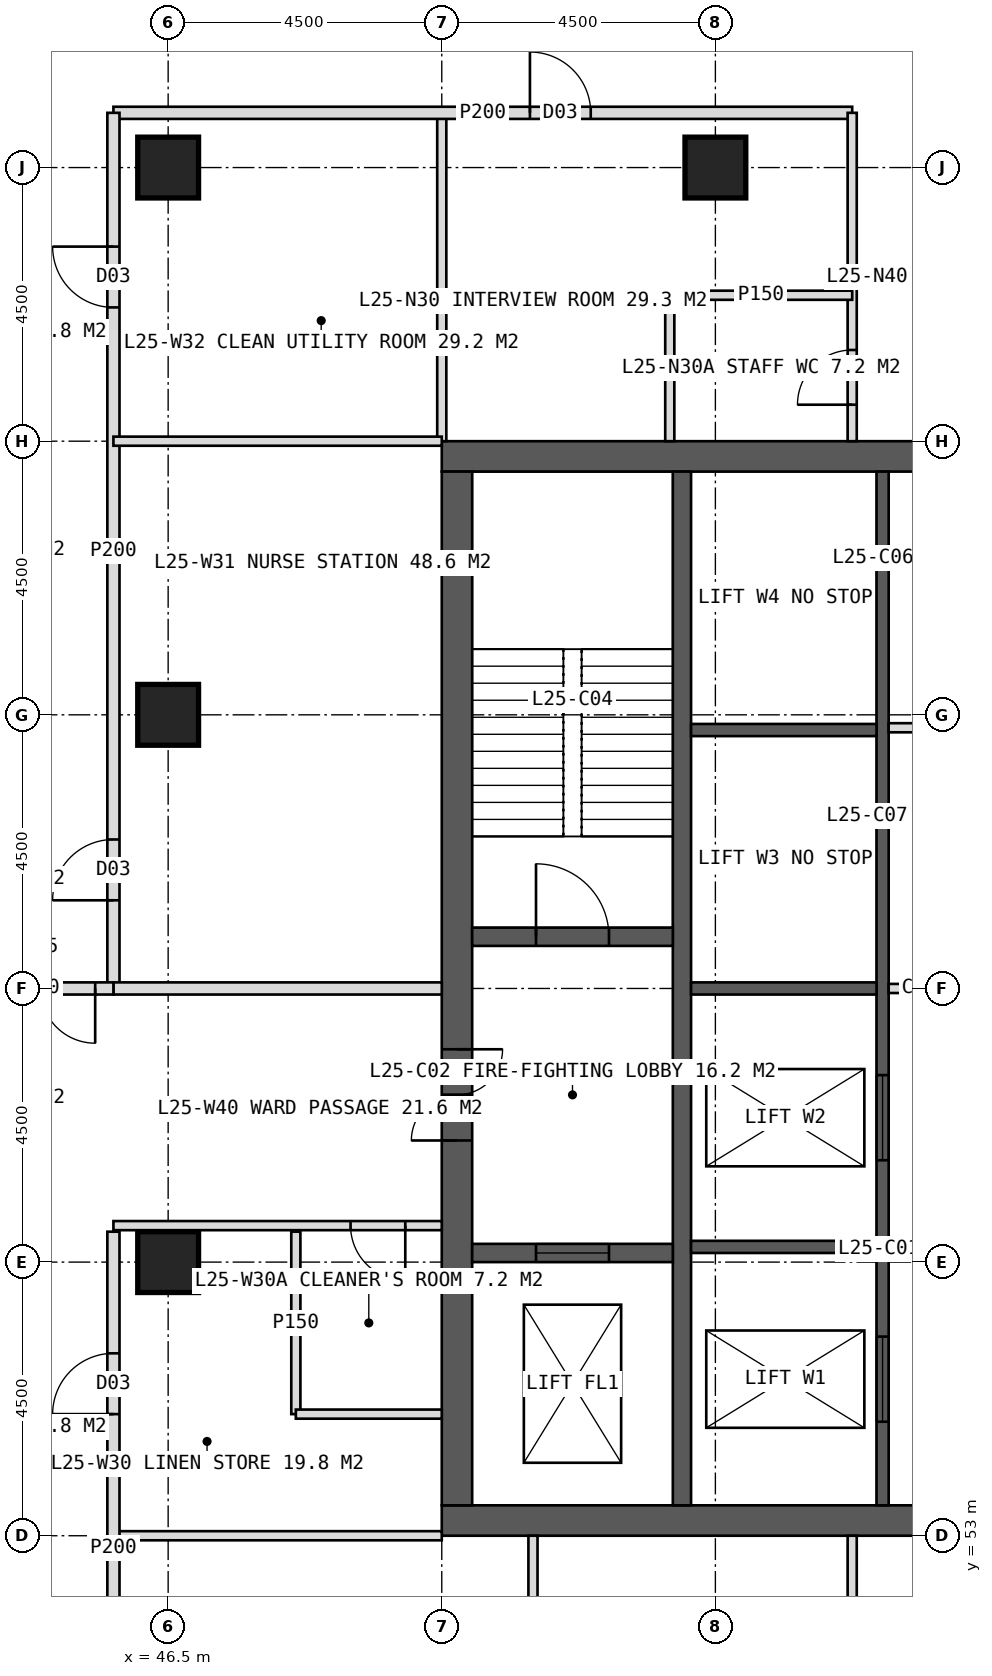
"""IFC4 building model, lengths in metres.
Left out: names, types, materials, properties, quantities, classifications, styles, units other than length and angle.
Written with IfcOpenShell. Run it as: python <this file> out.ifc"""

import sys

from ifc_helpers import new_model, si_unit, direction, frame, frame_2d, origin, origin_2d, place, context, subcontext, project, spatial, rectangle, hollow_rectangle, extrude, element, fill, save


model = new_model("IFC4")
c1 = context("Model", 3, precision=1e-05, world=origin(), true_north=direction((0.0, 1.0)))
c2 = subcontext(c1, "Body", "Model", "MODEL_VIEW")
j1 = project(units=[si_unit("LENGTHUNIT", "METRE"), si_unit("PLANEANGLEUNIT", "RADIAN")], contexts=[c1])
p1 = place(None, origin())
s1 = spatial("IfcSite", under=j1, at=p1, CompositionType="ELEMENT")
p2 = place(p1, origin())
s2 = spatial("IfcBuilding", under=s1, at=p2, CompositionType="ELEMENT")
p3 = place(p2, frame((0.0, 0.0, 108.0)))
s3 = spatial("IfcBuildingStorey", under=s2, at=p3, CompositionType="ELEMENT", Elevation=108.0)
p4 = place(p3, frame((51.0, 70.75, 0.0), z_axis=(0.0, 0.0, 1.0), x_axis=(1.0, 0.0, 0.0)))
e1 = element("IfcWall", 1, at=p4, inside=s3, PredefinedType="SHEAR", context=c2, shape_type="SweptSolid", body=[
    extrude(rectangle(XDim=18.0, YDim=0.5, at=frame_2d((9.0, 0.0))), origin(), (0.0, 0.0, 1.0), 4.0),
])
p5 = place(p4, frame((8.1, 0.0, 0.0)))
e2 = element("IfcOpeningElement", 2, at=p5, cuts=e1, PredefinedType="OPENING", context=c2, shape_type="SweptSolid", body=[
    extrude(rectangle(XDim=1.8, YDim=2.2, at=frame_2d((0.9, 1.1))), frame((0.0, 0.26, 0.0), z_axis=(0.0, -1.0, 0.0), x_axis=(1.0, 0.0, 0.0)), (0.0, 0.0, 1.0), 0.52),
])
p6 = place(p3, frame((51.0, 53.25, 0.0), z_axis=(0.0, 0.0, 1.0), x_axis=(1.0, 0.0, 0.0)))
e3 = element("IfcWall", 3, at=p6, inside=s3, PredefinedType="SHEAR", context=c2, shape_type="SweptSolid", body=[
    extrude(rectangle(XDim=18.0, YDim=0.5, at=frame_2d((9.0, 0.0))), origin(), (0.0, 0.0, 1.0), 4.0),
])
p7 = place(p6, frame((8.1, 0.0, 0.0)))
e4 = element("IfcOpeningElement", 4, at=p7, cuts=e3, PredefinedType="OPENING", context=c2, shape_type="SweptSolid", body=[
    extrude(rectangle(XDim=1.8, YDim=2.2, at=frame_2d((0.9, 1.1))), frame((0.0, 0.26, 0.0), z_axis=(0.0, -1.0, 0.0), x_axis=(1.0, 0.0, 0.0)), (0.0, 0.0, 1.0), 0.52),
])
p8 = place(p3, frame((51.25, 53.5, 0.0), z_axis=(0.0, 0.0, 1.0), x_axis=(0.0, 1.0, 0.0)))
e5 = element("IfcWall", 5, at=p8, inside=s3, PredefinedType="SHEAR", context=c2, shape_type="SweptSolid", body=[
    extrude(rectangle(XDim=17.0, YDim=0.5, at=frame_2d((8.5, 0.0))), origin(), (0.0, 0.0, 1.0), 4.0),
])
p9 = place(p8, frame((6.0, 0.0, 0.0)))
e6 = element("IfcOpeningElement", 6, at=p9, cuts=e5, PredefinedType="OPENING", context=c2, shape_type="SweptSolid", body=[
    extrude(rectangle(XDim=1.5, YDim=2.2, at=frame_2d((0.75, 1.1))), frame((0.0, 0.26, 0.0), z_axis=(0.0, -1.0, 0.0), x_axis=(1.0, 0.0, 0.0)), (0.0, 0.0, 1.0), 0.52),
])
p10 = place(p3, frame((54.95, 53.5, 0.0), z_axis=(0.0, 0.0, 1.0), x_axis=(0.0, 1.0, 0.0)))
e7 = element("IfcWall", 7, at=p10, inside=s3, PredefinedType="SHEAR", context=c2, shape_type="SweptSolid", body=[
    extrude(rectangle(XDim=17.0, YDim=0.3, at=frame_2d((8.5, 0.0))), origin(), (0.0, 0.0, 1.0), 4.0),
])
p11 = place(p3, frame((58.25, 53.5, 0.0), z_axis=(0.0, 0.0, 1.0), x_axis=(0.0, 1.0, 0.0)))
e8 = element("IfcWall", 8, at=p11, inside=s3, PredefinedType="SHEAR", context=c2, shape_type="SweptSolid", body=[
    extrude(rectangle(XDim=17.0, YDim=0.2, at=frame_2d((8.5, 0.0))), origin(), (0.0, 0.0, 1.0), 4.0),
])
p12 = place(p11, frame((1.375, 0.0, 0.0)))
e9 = element("IfcOpeningElement", 9, at=p12, cuts=e8, PredefinedType="OPENING", context=c2, shape_type="SweptSolid", body=[
    extrude(rectangle(XDim=1.4, YDim=2.2, at=frame_2d((0.7, 1.1))), frame((0.0, 0.11, 0.0), z_axis=(0.0, -1.0, 0.0), x_axis=(1.0, 0.0, 0.0)), (0.0, 0.0, 1.0), 0.22),
])
p13 = place(p11, frame((5.675, 0.0, 0.0)))
e10 = element("IfcOpeningElement", 10, at=p13, cuts=e8, PredefinedType="OPENING", context=c2, shape_type="SweptSolid", body=[
    extrude(rectangle(XDim=1.4, YDim=2.2, at=frame_2d((0.7, 1.1))), frame((0.0, 0.11, 0.0), z_axis=(0.0, -1.0, 0.0), x_axis=(1.0, 0.0, 0.0)), (0.0, 0.0, 1.0), 0.22),
])
for number, where, z_axis, x_axis in (
    (11, (55.1, 57.75, 0.0), (0.0, 0.0, 1.0), (1.0, 0.0, 0.0)),
    (12, (55.1, 62.0, 0.0), (0.0, 0.0, 1.0), (1.0, 0.0, 0.0)),
    (13, (55.1, 66.25, 0.0), (0.0, 0.0, 1.0), (1.0, 0.0, 0.0)),
):
    element("IfcWall", number, at=place(p3, frame(where, z_axis=z_axis, x_axis=x_axis)), inside=s3, PredefinedType="SHEAR", context=c2, shape_type="SweptSolid", body=[
        extrude(rectangle(XDim=3.05, YDim=0.2, at=frame_2d((1.525, 0.0))), origin(), (0.0, 0.0, 1.0), 4.0),
    ])
p14 = place(p3, frame((51.5, 62.85, 0.0), z_axis=(0.0, 0.0, 1.0), x_axis=(1.0, 0.0, 0.0)))
e14 = element("IfcWall", 14, at=p14, inside=s3, PredefinedType="SHEAR", context=c2, shape_type="SweptSolid", body=[
    extrude(rectangle(XDim=3.3, YDim=0.3, at=frame_2d((1.65, 0.0))), origin(), (0.0, 0.0, 1.0), 4.0),
])
p15 = place(p14, frame((1.05, 0.0, 0.0)))
e15 = element("IfcOpeningElement", 15, at=p15, cuts=e14, PredefinedType="OPENING", context=c2, shape_type="SweptSolid", body=[
    extrude(rectangle(XDim=1.2, YDim=2.1, at=frame_2d((0.6, 1.05))), frame((0.0, 0.16, 0.0), z_axis=(0.0, -1.0, 0.0), x_axis=(1.0, 0.0, 0.0)), (0.0, 0.0, 1.0), 0.32),
])
p16 = place(p3, frame((51.5, 57.65, 0.0), z_axis=(0.0, 0.0, 1.0), x_axis=(1.0, 0.0, 0.0)))
e16 = element("IfcWall", 16, at=p16, inside=s3, PredefinedType="SHEAR", context=c2, shape_type="SweptSolid", body=[
    extrude(rectangle(XDim=3.3, YDim=0.3, at=frame_2d((1.65, 0.0))), origin(), (0.0, 0.0, 1.0), 4.0),
])
p17 = place(p16, frame((1.05, 0.0, 0.0)))
e17 = element("IfcOpeningElement", 17, at=p17, cuts=e16, PredefinedType="OPENING", context=c2, shape_type="SweptSolid", body=[
    extrude(rectangle(XDim=1.2, YDim=2.2, at=frame_2d((0.6, 1.1))), frame((0.0, 0.16, 0.0), z_axis=(0.0, -1.0, 0.0), x_axis=(1.0, 0.0, 0.0)), (0.0, 0.0, 1.0), 0.32),
])
for number, where, z_axis, x_axis in (
    (18, (46.5, 75.5, 0.0), (0.0, 0.0, 1.0), (1.0, 0.0, 0.0)),
    (19, (55.5, 75.5, 0.0), (0.0, 0.0, 1.0), (1.0, 0.0, 0.0)),
    (20, (46.5, 57.5, 0.0), (0.0, 0.0, 1.0), (1.0, 0.0, 0.0)),
    (21, (46.5, 66.5, 0.0), (0.0, 0.0, 1.0), (1.0, 0.0, 0.0)),
):
    element("IfcColumn", number, at=place(p3, frame(where, z_axis=z_axis, x_axis=x_axis)), inside=s3, PredefinedType="COLUMN", context=c2, shape_type="SweptSolid", body=[
        extrude(hollow_rectangle(XDim=1.0, YDim=1.0, WallThickness=0.1, at=origin_2d()), origin(), (0.0, 0.0, 1.0), 4.0),
    ])
p18 = place(p3, frame((51.0, 71.0, 0.0), z_axis=(0.0, 0.0, 1.0), x_axis=(0.0, 1.0, 0.0)))
e22 = element("IfcWall", 22, at=p18, inside=s3, PredefinedType="PARTITIONING", context=c2, shape_type="SweptSolid", body=[
    extrude(rectangle(XDim=5.4, YDim=0.15, at=frame_2d((2.7, 0.0))), origin(), (0.0, 0.0, 1.0), 3.75),
])
p19 = place(p3, frame((45.6, 76.4, 0.0), z_axis=(0.0, 0.0, 1.0), x_axis=(1.0, 0.0, 0.0)))
e23 = element("IfcWall", 23, at=p19, inside=s3, PredefinedType="PARTITIONING", context=c2, shape_type="SweptSolid", body=[
    extrude(rectangle(XDim=12.15, YDim=0.2, at=frame_2d((6.075, 0.0))), origin(), (0.0, 0.0, 1.0), 3.75),
])
p20 = place(p19, frame((6.85, 0.0, 0.0)))
e24 = element("IfcOpeningElement", 24, at=p20, cuts=e23, PredefinedType="OPENING", context=c2, shape_type="SweptSolid", body=[
    extrude(rectangle(XDim=1.0, YDim=2.1, at=frame_2d((0.5, 1.05))), frame((0.0, 0.11, 0.0), z_axis=(0.0, -1.0, 0.0), x_axis=(1.0, 0.0, 0.0)), (0.0, 0.0, 1.0), 0.22),
])
p21 = place(p3, frame((57.75, 71.0, 0.0), z_axis=(0.0, 0.0, 1.0), x_axis=(0.0, 1.0, 0.0)))
e25 = element("IfcWall", 25, at=p21, inside=s3, PredefinedType="PARTITIONING", context=c2, shape_type="SweptSolid", body=[
    extrude(rectangle(XDim=5.4, YDim=0.15, at=frame_2d((2.7, 0.0))), origin(), (0.0, 0.0, 1.0), 3.75),
])
p22 = place(p21, frame((0.6, 0.0, 0.0)))
e26 = element("IfcOpeningElement", 26, at=p22, cuts=e25, PredefinedType="OPENING", context=c2, shape_type="SweptSolid", body=[
    extrude(rectangle(XDim=0.9, YDim=2.1, at=frame_2d((0.45, 1.05))), frame((0.0, 0.085, 0.0), z_axis=(0.0, -1.0, 0.0), x_axis=(1.0, 0.0, 0.0)), (0.0, 0.0, 1.0), 0.17),
])
p23 = place(p3, frame((54.75, 73.4, 0.0), z_axis=(0.0, 0.0, 1.0), x_axis=(1.0, 0.0, 0.0)))
e27 = element("IfcWall", 27, at=p23, inside=s3, PredefinedType="PARTITIONING", context=c2, shape_type="SweptSolid", body=[
    extrude(rectangle(XDim=3.0, YDim=0.15, at=frame_2d((1.5, 0.0))), origin(), (0.0, 0.0, 1.0), 3.75),
])
p24 = place(p3, frame((54.75, 71.0, 0.0), z_axis=(0.0, 0.0, 1.0), x_axis=(0.0, 1.0, 0.0)))
e28 = element("IfcWall", 28, at=p24, inside=s3, PredefinedType="PARTITIONING", context=c2, shape_type="SweptSolid", body=[
    extrude(rectangle(XDim=2.4, YDim=0.15, at=frame_2d((1.2, 0.0))), origin(), (0.0, 0.0, 1.0), 3.75),
])
p25 = place(p3, frame((51.0, 53.0, 0.0), z_axis=(0.0, 0.0, 1.0), x_axis=(-1.0, 0.0, 0.0)))
e29 = element("IfcWall", 29, at=p25, inside=s3, PredefinedType="PARTITIONING", context=c2, shape_type="SweptSolid", body=[
    extrude(rectangle(XDim=5.4, YDim=0.15, at=frame_2d((2.7, 0.0))), origin(), (0.0, 0.0, 1.0), 3.75),
])
p26 = place(p3, frame((45.6, 47.6, 0.0), z_axis=(0.0, 0.0, 1.0), x_axis=(0.0, 1.0, 0.0)))
e30 = element("IfcWall", 30, at=p26, inside=s3, PredefinedType="PARTITIONING", context=c2, shape_type="SweptSolid", body=[
    extrude(rectangle(XDim=10.4, YDim=0.2, at=frame_2d((5.2, 0.0))), origin(), (0.0, 0.0, 1.0), 3.75),
])
p27 = place(p26, frame((7.4, 0.0, 0.0)))
e31 = element("IfcOpeningElement", 31, at=p27, cuts=e30, PredefinedType="OPENING", context=c2, shape_type="SweptSolid", body=[
    extrude(rectangle(XDim=1.0, YDim=2.1, at=frame_2d((0.5, 1.05))), frame((0.0, 0.11, 0.0), z_axis=(0.0, -1.0, 0.0), x_axis=(1.0, 0.0, 0.0)), (0.0, 0.0, 1.0), 0.22),
])
p28 = place(p3, frame((45.6, 62.0, 0.0), z_axis=(0.0, 0.0, 1.0), x_axis=(0.0, 1.0, 0.0)))
e32 = element("IfcWall", 32, at=p28, inside=s3, PredefinedType="PARTITIONING", context=c2, shape_type="SweptSolid", body=[
    extrude(rectangle(XDim=14.4, YDim=0.2, at=frame_2d((7.2, 0.0))), origin(), (0.0, 0.0, 1.0), 3.75),
])
p29 = place(p28, frame((1.45, 0.0, 0.0)))
e33 = element("IfcOpeningElement", 33, at=p29, cuts=e32, PredefinedType="OPENING", context=c2, shape_type="SweptSolid", body=[
    extrude(rectangle(XDim=1.0, YDim=2.1, at=frame_2d((0.5, 1.05))), frame((0.0, 0.11, 0.0), z_axis=(0.0, -1.0, 0.0), x_axis=(1.0, 0.0, 0.0)), (0.0, 0.0, 1.0), 0.22),
])
p30 = place(p28, frame((11.2, 0.0, 0.0)))
e34 = element("IfcOpeningElement", 34, at=p30, cuts=e32, PredefinedType="OPENING", context=c2, shape_type="SweptSolid", body=[
    extrude(rectangle(XDim=1.0, YDim=2.1, at=frame_2d((0.5, 1.05))), frame((0.0, 0.11, 0.0), z_axis=(0.0, -1.0, 0.0), x_axis=(1.0, 0.0, 0.0)), (0.0, 0.0, 1.0), 0.22),
])
p31 = place(p3, frame((51.0, 58.1, 0.0), z_axis=(0.0, 0.0, 1.0), x_axis=(-1.0, 0.0, 0.0)))
e35 = element("IfcWall", 35, at=p31, inside=s3, PredefinedType="PARTITIONING", context=c2, shape_type="SweptSolid", body=[
    extrude(rectangle(XDim=5.4, YDim=0.15, at=frame_2d((2.7, 0.0))), origin(), (0.0, 0.0, 1.0), 3.75),
])
p32 = place(p31, frame((0.6, 0.0, 0.0)))
e36 = element("IfcOpeningElement", 36, at=p32, cuts=e35, PredefinedType="OPENING", context=c2, shape_type="SweptSolid", body=[
    extrude(rectangle(XDim=0.9, YDim=2.1, at=frame_2d((0.45, 1.05))), frame((0.0, 0.085, 0.0), z_axis=(0.0, -1.0, 0.0), x_axis=(1.0, 0.0, 0.0)), (0.0, 0.0, 1.0), 0.17),
])
p33 = place(p3, frame((51.0, 62.0, 0.0), z_axis=(0.0, 0.0, 1.0), x_axis=(-1.0, 0.0, 0.0)))
e37 = element("IfcWall", 37, at=p33, inside=s3, PredefinedType="SOLIDWALL", context=c2, shape_type="SweptSolid", body=[
    extrude(rectangle(XDim=5.4, YDim=0.2, at=frame_2d((2.7, 0.0))), origin(), (0.0, 0.0, 1.0), 2.95),
])
p34 = place(p3, frame((51.0, 71.0, 0.0), z_axis=(0.0, 0.0, 1.0), x_axis=(-1.0, 0.0, 0.0)))
e38 = element("IfcWall", 38, at=p34, inside=s3, PredefinedType="PARTITIONING", context=c2, shape_type="SweptSolid", body=[
    extrude(rectangle(XDim=5.4, YDim=0.15, at=frame_2d((2.7, 0.0))), origin(), (0.0, 0.0, 1.0), 3.75),
])
p35 = place(p3, frame((48.6, 55.0, 0.0), z_axis=(0.0, 0.0, 1.0), x_axis=(0.0, 1.0, 0.0)))
e39 = element("IfcWall", 39, at=p35, inside=s3, PredefinedType="PARTITIONING", context=c2, shape_type="SweptSolid", body=[
    extrude(rectangle(XDim=3.0, YDim=0.15, at=frame_2d((1.5, 0.0))), origin(), (0.0, 0.0, 1.0), 3.75),
])
p36 = place(p3, frame((51.0, 55.0, 0.0), z_axis=(0.0, 0.0, 1.0), x_axis=(-1.0, 0.0, 0.0)))
e40 = element("IfcWall", 40, at=p36, inside=s3, PredefinedType="PARTITIONING", context=c2, shape_type="SweptSolid", body=[
    extrude(rectangle(XDim=2.4, YDim=0.15, at=frame_2d((1.2, 0.0))), origin(), (0.0, 0.0, 1.0), 3.75),
])
for number, where, z_axis, x_axis in (
    (41, (57.75, 53.0, 0.0), (0.0, 0.0, 1.0), (0.0, -1.0, 0.0)),
    (42, (52.5, 53.0, 0.0), (0.0, 0.0, 1.0), (0.0, -1.0, 0.0)),
):
    element("IfcWall", number, at=place(p3, frame(where, z_axis=z_axis, x_axis=x_axis)), inside=s3, PredefinedType="PARTITIONING", context=c2, shape_type="SweptSolid", body=[
        extrude(rectangle(XDim=5.4, YDim=0.15, at=frame_2d((2.7, 0.0))), origin(), (0.0, 0.0, 1.0), 3.75),
    ])
p37 = place(p3, frame((45.6, 62.0, 0.0), z_axis=(0.0, 0.0, 1.0), x_axis=(-1.0, 0.0, 0.0)))
e43 = element("IfcWall", 43, at=p37, inside=s3, PredefinedType="SOLIDWALL", context=c2, shape_type="SweptSolid", body=[
    extrude(rectangle(XDim=2.7, YDim=0.2, at=frame_2d((1.35, 0.0))), origin(), (0.0, 0.0, 1.0), 2.95),
])
p38 = place(p37, frame((0.3, 0.0, 0.0)))
e44 = element("IfcOpeningElement", 44, at=p38, cuts=e43, PredefinedType="OPENING", context=c2, shape_type="SweptSolid", body=[
    extrude(rectangle(XDim=1.8, YDim=2.2, at=frame_2d((0.9, 1.1))), frame((0.0, 0.11, 0.0), z_axis=(0.0, -1.0, 0.0), x_axis=(1.0, 0.0, 0.0)), (0.0, 0.0, 1.0), 0.22),
])
p39 = place(p3, frame((58.35, 62.0, 0.0), z_axis=(0.0, 0.0, 1.0), x_axis=(1.0, 0.0, 0.0)))
e45 = element("IfcWall", 45, at=p39, inside=s3, PredefinedType="PARTITIONING", context=c2, shape_type="SweptSolid", body=[
    extrude(rectangle(XDim=3.3, YDim=0.15, at=frame_2d((1.65, 0.0))), origin(), (0.0, 0.0, 1.0), 3.75),
])
p40 = place(p39, frame((1.15, 0.0, 0.0)))
e46 = element("IfcOpeningElement", 46, at=p40, cuts=e45, PredefinedType="OPENING", context=c2, shape_type="SweptSolid", body=[
    extrude(rectangle(XDim=1.0, YDim=2.1, at=frame_2d((0.5, 1.05))), frame((0.0, 0.085, 0.0), z_axis=(0.0, -1.0, 0.0), x_axis=(1.0, 0.0, 0.0)), (0.0, 0.0, 1.0), 0.17),
])
p41 = place(p3, frame((58.35, 66.288, 0.0), z_axis=(0.0, 0.0, 1.0), x_axis=(1.0, 0.0, 0.0)))
e47 = element("IfcWall", 47, at=p41, inside=s3, PredefinedType="PARTITIONING", context=c2, shape_type="SweptSolid", body=[
    extrude(rectangle(XDim=3.3, YDim=0.15, at=frame_2d((1.65, 0.0))), origin(), (0.0, 0.0, 1.0), 3.75),
])
p42 = place(p22, origin())
e48 = element("IfcDoor", 48, at=p42, inside=s3, OperationType="SINGLE_SWING_LEFT", PredefinedType="DOOR", context=c2, shape_type="SweptSolid", body=[
    extrude(rectangle(XDim=0.9, YDim=2.1, at=frame_2d((0.45, 1.05))), frame((0.0, 0.025, 0.0), z_axis=(0.0, -1.0, 0.0), x_axis=(1.0, 0.0, 0.0)), (0.0, 0.0, 1.0), 0.05),
])
fill(e26, e48)
p43 = place(p20, origin())
e49 = element("IfcDoor", 49, at=p43, inside=s3, OperationType="SINGLE_SWING_LEFT", PredefinedType="DOOR", context=c2, shape_type="SweptSolid", body=[
    extrude(rectangle(XDim=1.0, YDim=2.1, at=frame_2d((0.5, 1.05))), frame((0.0, 0.025, 0.0), z_axis=(0.0, -1.0, 0.0), x_axis=(1.0, 0.0, 0.0)), (0.0, 0.0, 1.0), 0.05),
])
fill(e24, e49)
p44 = place(p32, origin())
e50 = element("IfcDoor", 50, at=p44, inside=s3, OperationType="SINGLE_SWING_LEFT", PredefinedType="DOOR", context=c2, shape_type="SweptSolid", body=[
    extrude(rectangle(XDim=0.9, YDim=2.1, at=frame_2d((0.45, 1.05))), frame((0.0, 0.025, 0.0), z_axis=(0.0, -1.0, 0.0), x_axis=(1.0, 0.0, 0.0)), (0.0, 0.0, 1.0), 0.05),
])
fill(e36, e50)
p45 = place(p27, origin())
e51 = element("IfcDoor", 51, at=p45, inside=s3, OperationType="SINGLE_SWING_LEFT", PredefinedType="DOOR", context=c2, shape_type="SweptSolid", body=[
    extrude(rectangle(XDim=1.0, YDim=2.1, at=frame_2d((0.5, 1.05))), frame((0.0, 0.025, 0.0), z_axis=(0.0, -1.0, 0.0), x_axis=(1.0, 0.0, 0.0)), (0.0, 0.0, 1.0), 0.05),
])
fill(e31, e51)
p46 = place(p29, origin())
e52 = element("IfcDoor", 52, at=p46, inside=s3, OperationType="SINGLE_SWING_LEFT", PredefinedType="DOOR", context=c2, shape_type="SweptSolid", body=[
    extrude(rectangle(XDim=1.0, YDim=2.1, at=frame_2d((0.5, 1.05))), frame((0.0, 0.025, 0.0), z_axis=(0.0, -1.0, 0.0), x_axis=(1.0, 0.0, 0.0)), (0.0, 0.0, 1.0), 0.05),
])
fill(e33, e52)
p47 = place(p30, origin())
e53 = element("IfcDoor", 53, at=p47, inside=s3, OperationType="SINGLE_SWING_RIGHT", PredefinedType="DOOR", context=c2, shape_type="SweptSolid", body=[
    extrude(rectangle(XDim=1.0, YDim=2.1, at=frame_2d((0.5, 1.05))), frame((0.0, 0.025, 0.0), z_axis=(0.0, -1.0, 0.0), x_axis=(1.0, 0.0, 0.0)), (0.0, 0.0, 1.0), 0.05),
])
fill(e34, e53)
p48 = place(p38, origin())
e54 = element("IfcDoor", 54, at=p48, inside=s3, OperationType="DOUBLE_DOOR_DOUBLE_SWING", PredefinedType="DOOR", context=c2, shape_type="SweptSolid", body=[
    extrude(rectangle(XDim=1.8, YDim=2.2, at=frame_2d((0.9, 1.1))), frame((0.0, 0.025, 0.0), z_axis=(0.0, -1.0, 0.0), x_axis=(1.0, 0.0, 0.0)), (0.0, 0.0, 1.0), 0.05),
])
fill(e44, e54)
p49 = place(p9, origin())
e55 = element("IfcDoor", 55, at=p49, inside=s3, OperationType="DOUBLE_DOOR_SINGLE_SWING", PredefinedType="DOOR", context=c2, shape_type="SweptSolid", body=[
    extrude(rectangle(XDim=1.5, YDim=2.2, at=frame_2d((0.75, 1.1))), frame((0.0, 0.025, 0.0), z_axis=(0.0, -1.0, 0.0), x_axis=(1.0, 0.0, 0.0)), (0.0, 0.0, 1.0), 0.05),
])
fill(e6, e55)
p50 = place(p15, origin())
e56 = element("IfcDoor", 56, at=p50, inside=s3, OperationType="SINGLE_SWING_LEFT", PredefinedType="DOOR", context=c2, shape_type="SweptSolid", body=[
    extrude(rectangle(XDim=1.2, YDim=2.1, at=frame_2d((0.6, 1.05))), frame((0.0, 0.025, 0.0), z_axis=(0.0, -1.0, 0.0), x_axis=(1.0, 0.0, 0.0)), (0.0, 0.0, 1.0), 0.05),
])
fill(e15, e56)
p51 = place(p17, origin())
e57 = element("IfcDoor", 57, at=p51, inside=s3, OperationType="SLIDING_TO_LEFT", PredefinedType="DOOR", context=c2, shape_type="SweptSolid", body=[
    extrude(rectangle(XDim=1.2, YDim=2.2, at=frame_2d((0.6, 1.1))), frame((0.0, 0.025, 0.0), z_axis=(0.0, -1.0, 0.0), x_axis=(1.0, 0.0, 0.0)), (0.0, 0.0, 1.0), 0.05),
])
fill(e17, e57)
p52 = place(p12, origin())
e58 = element("IfcDoor", 58, at=p52, inside=s3, OperationType="SLIDING_TO_LEFT", PredefinedType="DOOR", context=c2, shape_type="SweptSolid", body=[
    extrude(rectangle(XDim=1.4, YDim=2.2, at=frame_2d((0.7, 1.1))), frame((0.0, 0.025, 0.0), z_axis=(0.0, -1.0, 0.0), x_axis=(1.0, 0.0, 0.0)), (0.0, 0.0, 1.0), 0.05),
])
fill(e9, e58)
p53 = place(p13, origin())
e59 = element("IfcDoor", 59, at=p53, inside=s3, OperationType="SLIDING_TO_LEFT", PredefinedType="DOOR", context=c2, shape_type="SweptSolid", body=[
    extrude(rectangle(XDim=1.4, YDim=2.2, at=frame_2d((0.7, 1.1))), frame((0.0, 0.025, 0.0), z_axis=(0.0, -1.0, 0.0), x_axis=(1.0, 0.0, 0.0)), (0.0, 0.0, 1.0), 0.05),
])
fill(e10, e59)
save(model, sys.argv[1])
